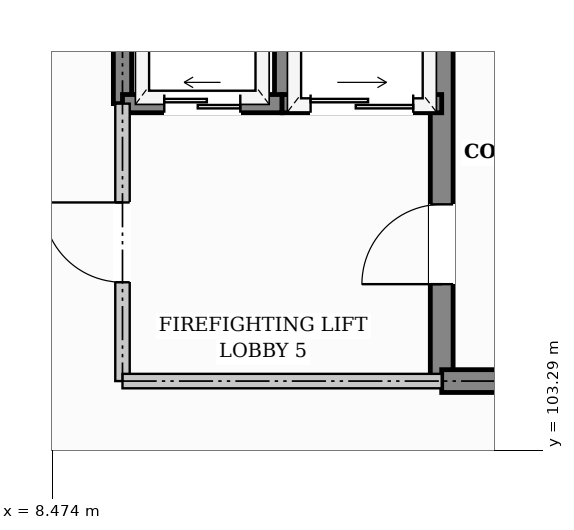
"""IFC4 building model, lengths in metres.
Left out: names, types, materials, properties, quantities, classifications, styles, units other than length and angle.
Written with IfcOpenShell. Run it as: python <this file> out.ifc"""

import sys

from ifc_helpers import new_model, si_unit, direction, frame, frame_2d, origin, place, context, subcontext, project, spatial, rectangle, extrude, element, fill, save


model = new_model("IFC4")
c1 = context("Model", 3, precision=1e-05, world=origin(), true_north=direction((0.0, 1.0)))
c2 = subcontext(c1, "Body", "Model", "MODEL_VIEW")
j1 = project(units=[si_unit("LENGTHUNIT", "METRE"), si_unit("PLANEANGLEUNIT", "RADIAN")], contexts=[c1])
p1 = place(None, origin())
s1 = spatial("IfcSite", under=j1, at=p1, CompositionType="ELEMENT")
p2 = place(p1, origin())
s2 = spatial("IfcBuilding", under=s1, at=p2, CompositionType="ELEMENT")
p3 = place(p2, frame((0.0, 0.0, 5.1)))
s3 = spatial("IfcBuildingStorey", under=s2, at=p3, CompositionType="ELEMENT", Elevation=5.1)
p4 = place(p3, frame((13.6, 104.2, 0.0), z_axis=(0.0, 0.0, 1.0), x_axis=(0.0, 1.0, 0.0)))
e1 = element("IfcWall", 1, at=p4, inside=s3, PredefinedType="SHEAR", context=c2, shape_type="SweptSolid", body=[
    extrude(rectangle(XDim=6.0, YDim=0.3, at=frame_2d((3.0, 0.0))), origin(), (0.0, 0.0, 1.0), 4.22),
])
p5 = place(p4, frame((1.275, 0.0, 0.0)))
e2 = element("IfcOpeningElement", 2, at=p5, cuts=e1, PredefinedType="OPENING", context=c2, shape_type="SweptSolid", body=[
    extrude(rectangle(XDim=1.05, YDim=2.15, at=frame_2d((0.525, 1.075))), frame((0.0, 0.16, 0.0), z_axis=(0.0, -1.0, 0.0), x_axis=(1.0, 0.0, 0.0)), (0.0, 0.0, 1.0), 0.32),
])
p6 = place(p3, frame((13.6, 104.2, 0.0), z_axis=(0.0, 0.0, 1.0), x_axis=(1.0, 0.0, 0.0)))
e3 = element("IfcWall", 3, at=p6, inside=s3, PredefinedType="SHEAR", context=c2, shape_type="SweptSolid", body=[
    extrude(rectangle(XDim=7.0, YDim=0.3, at=frame_2d((3.5, 0.0))), origin(), (0.0, 0.0, 1.0), 4.22),
])
p7 = place(p3, frame((9.4, 107.85, 0.0), z_axis=(0.0, 0.0, 1.0), x_axis=(0.0, 1.0, 0.0)))
e4 = element("IfcWall", 4, at=p7, inside=s3, PredefinedType="SHEAR", context=c2, shape_type="SweptSolid", body=[
    extrude(rectangle(XDim=2.35, YDim=0.24, at=frame_2d((1.175, 0.0))), origin(), (0.0, 0.0, 1.0), 4.22),
])
p8 = place(p3, frame((11.5, 107.85, 0.0), z_axis=(0.0, 0.0, 1.0), x_axis=(0.0, 1.0, 0.0)))
e5 = element("IfcWall", 5, at=p8, inside=s3, PredefinedType="SHEAR", context=c2, shape_type="SweptSolid", body=[
    extrude(rectangle(XDim=2.35, YDim=0.2, at=frame_2d((1.175, 0.0))), origin(), (0.0, 0.0, 1.0), 4.22),
])
p9 = place(p3, frame((9.4, 107.85, 0.0), z_axis=(0.0, 0.0, 1.0), x_axis=(1.0, 0.0, 0.0)))
e6 = element("IfcWall", 6, at=p9, inside=s3, PredefinedType="SHEAR", context=c2, shape_type="SweptSolid", body=[
    extrude(rectangle(XDim=2.1, YDim=0.24, at=frame_2d((1.05, 0.0))), origin(), (0.0, 0.0, 1.0), 4.22),
])
p10 = place(p9, frame((0.55, 0.0, 0.0)))
e7 = element("IfcOpeningElement", 7, at=p10, cuts=e6, PredefinedType="OPENING", context=c2, shape_type="SweptSolid", body=[
    extrude(rectangle(XDim=1.0, YDim=2.1, at=frame_2d((0.5, 1.05))), frame((0.0, 0.13, 0.0), z_axis=(0.0, -1.0, 0.0), x_axis=(1.0, 0.0, 0.0)), (0.0, 0.0, 1.0), 0.26),
])
p11 = place(p3, frame((11.5, 107.85, 0.0), z_axis=(0.0, 0.0, 1.0), x_axis=(1.0, 0.0, 0.0)))
e8 = element("IfcWall", 8, at=p11, inside=s3, PredefinedType="SHEAR", context=c2, shape_type="SweptSolid", body=[
    extrude(rectangle(XDim=2.1, YDim=0.24, at=frame_2d((1.05, 0.0))), origin(), (0.0, 0.0, 1.0), 4.22),
])
p12 = place(p11, frame((0.375, 0.0, 0.0)))
e9 = element("IfcOpeningElement", 9, at=p12, cuts=e8, PredefinedType="OPENING", context=c2, shape_type="SweptSolid", body=[
    extrude(rectangle(XDim=1.35, YDim=2.2, at=frame_2d((0.675, 1.1))), frame((0.0, 0.13, 0.0), z_axis=(0.0, -1.0, 0.0), x_axis=(1.0, 0.0, 0.0)), (0.0, 0.0, 1.0), 0.26),
])
p13 = place(p3, frame((9.4, 104.2, 0.0), z_axis=(0.0, 0.0, 1.0), x_axis=(0.0, 1.0, 0.0)))
e10 = element("IfcWall", 10, at=p13, inside=s3, PredefinedType="PARTITIONING", context=c2, shape_type="SweptSolid", body=[
    extrude(rectangle(XDim=3.65, YDim=0.19, at=frame_2d((1.825, 0.0))), origin(), (0.0, 0.0, 1.0), 4.22),
])
p14 = place(p13, frame((1.3, 0.0, 0.0)))
e11 = element("IfcOpeningElement", 11, at=p14, cuts=e10, PredefinedType="OPENING", context=c2, shape_type="SweptSolid", body=[
    extrude(rectangle(XDim=1.05, YDim=2.15, at=frame_2d((0.525, 1.075))), frame((0.0, 0.105, 0.0), z_axis=(0.0, -1.0, 0.0), x_axis=(1.0, 0.0, 0.0)), (0.0, 0.0, 1.0), 0.21),
])
p15 = place(p3, frame((9.4, 104.2, 0.0), z_axis=(0.0, 0.0, 1.0), x_axis=(1.0, 0.0, 0.0)))
e12 = element("IfcWall", 12, at=p15, inside=s3, PredefinedType="PARTITIONING", context=c2, shape_type="SweptSolid", body=[
    extrude(rectangle(XDim=4.2, YDim=0.19, at=frame_2d((2.1, 0.0))), origin(), (0.0, 0.0, 1.0), 4.22),
])
p16 = place(p5, origin())
e13 = element("IfcDoor", 13, at=p16, inside=s3, OperationType="SINGLE_SWING_LEFT", PredefinedType="DOOR", context=c2, shape_type="SweptSolid", body=[
    extrude(rectangle(XDim=1.05, YDim=2.15, at=frame_2d((0.525, 1.075))), frame((0.0, 0.025, 0.0), z_axis=(0.0, -1.0, 0.0), x_axis=(1.0, 0.0, 0.0)), (0.0, 0.0, 1.0), 0.05),
])
fill(e2, e13)
p17 = place(p10, origin())
e14 = element("IfcDoor", 14, at=p17, inside=s3, OperationType="SLIDING_TO_LEFT", PredefinedType="DOOR", context=c2, shape_type="SweptSolid", body=[
    extrude(rectangle(XDim=1.0, YDim=2.1, at=frame_2d((0.5, 1.05))), frame((0.0, 0.025, 0.0), z_axis=(0.0, -1.0, 0.0), x_axis=(1.0, 0.0, 0.0)), (0.0, 0.0, 1.0), 0.05),
])
fill(e7, e14)
p18 = place(p12, origin())
e15 = element("IfcDoor", 15, at=p18, inside=s3, OperationType="SLIDING_TO_RIGHT", PredefinedType="DOOR", context=c2, shape_type="SweptSolid", body=[
    extrude(rectangle(XDim=1.35, YDim=2.2, at=frame_2d((0.675, 1.1))), frame((0.0, 0.025, 0.0), z_axis=(0.0, -1.0, 0.0), x_axis=(1.0, 0.0, 0.0)), (0.0, 0.0, 1.0), 0.05),
])
fill(e9, e15)
p19 = place(p14, origin())
e16 = element("IfcDoor", 16, at=p19, inside=s3, OperationType="SINGLE_SWING_RIGHT", PredefinedType="DOOR", context=c2, shape_type="SweptSolid", body=[
    extrude(rectangle(XDim=1.05, YDim=2.15, at=frame_2d((0.525, 1.075))), frame((0.0, 0.025, 0.0), z_axis=(0.0, -1.0, 0.0), x_axis=(1.0, 0.0, 0.0)), (0.0, 0.0, 1.0), 0.05),
])
fill(e11, e16)
save(model, sys.argv[1])
